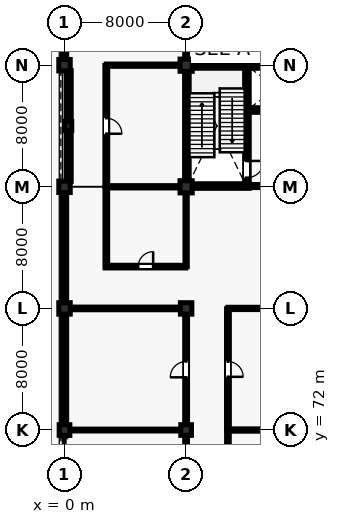
"""IFC4 building model, lengths in metres.
Left out: names, types, materials, properties, quantities, classifications, styles, units other than length and angle.
Written with IfcOpenShell. Run it as: python <this file> out.ifc"""

import sys

from ifc_helpers import new_model, si_unit, direction, frame, frame_2d, origin, origin_2d, place, context, subcontext, project, spatial, rectangle, extrude, element, fill, save


model = new_model("IFC4")
c1 = context("Model", 3, precision=1e-05, world=origin(), true_north=direction((0.0, 1.0)))
c2 = subcontext(c1, "Body", "Model", "MODEL_VIEW")
j1 = project(units=[si_unit("LENGTHUNIT", "METRE"), si_unit("PLANEANGLEUNIT", "RADIAN")], contexts=[c1])
p1 = place(None, origin())
s1 = spatial("IfcSite", under=j1, at=p1, CompositionType="ELEMENT")
p2 = place(p1, origin())
s2 = spatial("IfcBuilding", under=s1, at=p2, CompositionType="ELEMENT")
p3 = place(p2, origin())
s3 = spatial("IfcBuildingStorey", under=s2, at=p3, CompositionType="ELEMENT", Elevation=0.0)
p4 = place(p3, frame((0.0, 72.0, 0.0), z_axis=(0.0, 0.0, 1.0), x_axis=(1.0, 0.0, 0.0)))
e1 = element("IfcColumn", 1, at=p4, inside=s3, PredefinedType="COLUMN", context=c2, shape_type="SweptSolid", body=[
    extrude(rectangle(XDim=0.7, YDim=0.7, at=origin_2d()), origin(), (0.0, 0.0, 1.0), 5.28),
])
for number, where, z_axis, x_axis in (
    (2, (0.0, 80.0, 0.0), (0.0, 0.0, 1.0), (1.0, 0.0, 0.0)),
    (3, (0.0, 88.0, 0.0), (0.0, 0.0, 1.0), (1.0, 0.0, 0.0)),
    (4, (0.0, 96.0, 0.0), (0.0, 0.0, 1.0), (1.0, 0.0, 0.0)),
):
    element("IfcColumn", number, at=place(p3, frame(where, z_axis=z_axis, x_axis=x_axis)), inside=s3, PredefinedType="COLUMN", context=c2, shape_type="SweptSolid", body=[
        extrude(rectangle(XDim=0.75, YDim=0.75, at=origin_2d()), origin(), (0.0, 0.0, 1.0), 5.28),
    ])
p5 = place(p3, frame((8.0, 72.0, 0.0), z_axis=(0.0, 0.0, 1.0), x_axis=(1.0, 0.0, 0.0)))
e5 = element("IfcColumn", 5, at=p5, inside=s3, PredefinedType="COLUMN", context=c2, shape_type="SweptSolid", body=[
    extrude(rectangle(XDim=0.7, YDim=0.7, at=origin_2d()), origin(), (0.0, 0.0, 1.0), 5.28),
])
p6 = place(p3, frame((8.0, 80.0, 0.0), z_axis=(0.0, 0.0, 1.0), x_axis=(1.0, 0.0, 0.0)))
e6 = element("IfcColumn", 6, at=p6, inside=s3, PredefinedType="COLUMN", context=c2, shape_type="SweptSolid", body=[
    extrude(rectangle(XDim=0.75, YDim=0.75, at=origin_2d()), origin(), (0.0, 0.0, 1.0), 5.28),
])
for number, where, z_axis, x_axis in (
    (7, (8.0, 88.0, 0.0), (0.0, 0.0, 1.0), (1.0, 0.0, 0.0)),
    (8, (8.0, 96.0, 0.0), (0.0, 0.0, 1.0), (1.0, 0.0, 0.0)),
):
    element("IfcColumn", number, at=place(p3, frame(where, z_axis=z_axis, x_axis=x_axis)), inside=s3, PredefinedType="COLUMN", context=c2, shape_type="SweptSolid", body=[
        extrude(rectangle(XDim=0.8, YDim=0.8, at=origin_2d()), origin(), (0.0, 0.0, 1.0), 5.28),
    ])
p7 = place(p3, frame((0.25, 92.0, 0.0), z_axis=(0.0, 0.0, 1.0), x_axis=(1.0, 0.0, 0.0)))
e9 = element("IfcColumn", 9, at=p7, inside=s3, PredefinedType="PILASTER", context=c2, shape_type="SweptSolid", body=[
    extrude(rectangle(XDim=0.45, YDim=0.6, at=origin_2d()), origin(), (0.0, 0.0, 1.0), 5.28),
])
p8 = place(p3, frame((0.0, 72.335, 0.0), z_axis=(0.0, 0.0, 1.0), x_axis=(0.0, 1.0, 0.0)))
e10 = element("IfcWall", 10, at=p8, inside=s3, PredefinedType="SOLIDWALL", context=c2, shape_type="SweptSolid", body=[
    extrude(rectangle(XDim=7.305, YDim=0.28, at=frame_2d((3.652, 0.0))), origin(), (0.0, 0.0, 1.0), 4.674),
])
p9 = place(p8, frame((2.577, 0.0, 0.9)))
e11 = element("IfcOpeningElement", 11, at=p9, cuts=e10, PredefinedType="OPENING", context=c2, shape_type="SweptSolid", body=[
    extrude(rectangle(XDim=2.15, YDim=2.8, at=frame_2d((1.075, 1.4))), frame((0.0, 0.15, 0.0), z_axis=(0.0, -1.0, 0.0), x_axis=(1.0, 0.0, 0.0)), (0.0, 0.0, 1.0), 0.3),
])
p10 = place(p3, frame((0.0, 80.36, 0.0), z_axis=(0.0, 0.0, 1.0), x_axis=(0.0, 1.0, 0.0)))
e12 = element("IfcWall", 12, at=p10, inside=s3, PredefinedType="SOLIDWALL", context=c2, shape_type="SweptSolid", body=[
    extrude(rectangle(XDim=7.28, YDim=0.28, at=frame_2d((3.64, 0.0))), origin(), (0.0, 0.0, 1.0), 4.614),
])
p11 = place(p10, frame((0.735, 0.0, 0.95)))
e13 = element("IfcOpeningElement", 13, at=p11, cuts=e12, PredefinedType="OPENING", context=c2, shape_type="SweptSolid", body=[
    extrude(rectangle(XDim=1.15, YDim=1.65, at=frame_2d((0.575, 0.825))), frame((0.0, 0.15, 0.0), z_axis=(0.0, -1.0, 0.0), x_axis=(1.0, 0.0, 0.0)), (0.0, 0.0, 1.0), 0.3),
])
p12 = place(p10, frame((5.395, 0.0, 0.95)))
e14 = element("IfcOpeningElement", 14, at=p12, cuts=e12, PredefinedType="OPENING", context=c2, shape_type="SweptSolid", body=[
    extrude(rectangle(XDim=1.15, YDim=1.65, at=frame_2d((0.575, 0.825))), frame((0.0, 0.15, 0.0), z_axis=(0.0, -1.0, 0.0), x_axis=(1.0, 0.0, 0.0)), (0.0, 0.0, 1.0), 0.3),
])
p13 = place(p3, frame((0.3, 88.36, 0.0), z_axis=(0.0, 0.0, 1.0), x_axis=(0.0, 1.0, 0.0)))
e15 = element("IfcWall", 15, at=p13, inside=s3, PredefinedType="SOLIDWALL", context=c2, shape_type="SweptSolid", body=[
    extrude(rectangle(XDim=7.28, YDim=0.28, at=frame_2d((3.64, 0.0))), origin(), (0.0, 0.0, 1.0), 4.677),
])
p14 = place(p3, frame((0.0, 96.36, 0.0), z_axis=(0.0, 0.0, 1.0), x_axis=(0.0, 1.0, 0.0)))
e16 = element("IfcWall", 16, at=p14, inside=s3, PredefinedType="SOLIDWALL", context=c2, shape_type="SweptSolid", body=[
    extrude(rectangle(XDim=7.28, YDim=0.28, at=frame_2d((3.64, 0.0))), origin(), (0.0, 0.0, 1.0), 4.61),
])
p15 = place(p14, frame((2.54, 0.0, 0.0)))
e17 = element("IfcOpeningElement", 17, at=p15, cuts=e16, PredefinedType="OPENING", context=c2, shape_type="SweptSolid", body=[
    extrude(rectangle(XDim=2.2, YDim=2.5, at=frame_2d((1.1, 1.25))), frame((0.0, 0.15, 0.0), z_axis=(0.0, -1.0, 0.0), x_axis=(1.0, 0.0, 0.0)), (0.0, 0.0, 1.0), 0.3),
])
for number, where, z_axis, x_axis in (
    (18, (8.05, 88.29, 0.0), (0.0, 0.0, 1.0), (0.0, 1.0, 0.0)),
    (19, (8.29, 95.95, 0.0), (0.0, 0.0, 1.0), (1.0, 0.0, 0.0)),
):
    element("IfcWall", number, at=place(p3, frame(where, z_axis=z_axis, x_axis=x_axis)), inside=s3, PredefinedType="SHEAR", context=c2, shape_type="SweptSolid", body=[
        extrude(rectangle(XDim=7.42, YDim=0.3, at=frame_2d((3.71, 0.0))), origin(), (0.0, 0.0, 1.0), 5.035),
    ])
p16 = place(p3, frame((8.29, 88.05, 0.0), z_axis=(0.0, 0.0, 1.0), x_axis=(1.0, 0.0, 0.0)))
e20 = element("IfcWall", 20, at=p16, inside=s3, PredefinedType="SHEAR", context=c2, shape_type="SweptSolid", body=[
    extrude(rectangle(XDim=3.86, YDim=0.3, at=frame_2d((1.93, 0.0))), origin(), (0.0, 0.0, 1.0), 5.035),
])
p17 = place(p3, frame((12.0, 88.05, 0.0), z_axis=(0.0, 0.0, 1.0), x_axis=(0.0, 1.0, 0.0)))
e21 = element("IfcWall", 21, at=p17, inside=s3, PredefinedType="SHEAR", context=c2, shape_type="SweptSolid", body=[
    extrude(rectangle(XDim=7.9, YDim=0.3, at=frame_2d((3.95, 0.0))), origin(), (0.0, 0.0, 1.0), 5.035),
])
p18 = place(p17, frame((0.55, 0.0, 0.0)))
e22 = element("IfcOpeningElement", 22, at=p18, cuts=e21, PredefinedType="OPENING", context=c2, shape_type="SweptSolid", body=[
    extrude(rectangle(XDim=1.1, YDim=2.15, at=frame_2d((0.55, 1.075))), frame((0.0, 0.16, 0.0), z_axis=(0.0, -1.0, 0.0), x_axis=(1.0, 0.0, 0.0)), (0.0, 0.0, 1.0), 0.32),
])
p19 = place(p3, frame((12.0, 93.05, 0.0), z_axis=(0.0, 0.0, 1.0), x_axis=(1.0, 0.0, 0.0)))
e23 = element("IfcWall", 23, at=p19, inside=s3, PredefinedType="SHEAR", context=c2, shape_type="SweptSolid", body=[
    extrude(rectangle(XDim=3.95, YDim=0.3, at=frame_2d((1.975, 0.0))), origin(), (0.0, 0.0, 1.0), 5.035),
])
p20 = place(p19, frame((1.375, 0.0, 0.0)))
e24 = element("IfcOpeningElement", 24, at=p20, cuts=e23, PredefinedType="OPENING", context=c2, shape_type="SweptSolid", body=[
    extrude(rectangle(XDim=1.2, YDim=2.2, at=frame_2d((0.6, 1.1))), frame((0.0, 0.16, 0.0), z_axis=(0.0, -1.0, 0.0), x_axis=(1.0, 0.0, 0.0)), (0.0, 0.0, 1.0), 0.32),
])
p21 = place(p3, frame((12.0, 88.05, 0.0), z_axis=(0.0, 0.0, 1.0), x_axis=(1.0, 0.0, 0.0)))
e25 = element("IfcWall", 25, at=p21, inside=s3, PredefinedType="PARTITIONING", context=c2, shape_type="SweptSolid", body=[
    extrude(rectangle(XDim=3.61, YDim=0.2, at=frame_2d((1.805, 0.0))), origin(), (0.0, 0.0, 1.0), 4.327),
])
p22 = place(p21, frame((1.205, 0.0, 0.0)))
e26 = element("IfcOpeningElement", 26, at=p22, cuts=e25, PredefinedType="OPENING", context=c2, shape_type="SweptSolid", body=[
    extrude(rectangle(XDim=1.2, YDim=2.15, at=frame_2d((0.6, 1.075))), frame((0.0, 0.11, 0.0), z_axis=(0.0, -1.0, 0.0), x_axis=(1.0, 0.0, 0.0)), (0.0, 0.0, 1.0), 0.22),
])
p23 = place(p3, frame((2.7, 82.75, 0.0), z_axis=(0.0, 0.0, 1.0), x_axis=(1.0, 0.0, 0.0)))
e27 = element("IfcWall", 27, at=p23, inside=s3, PredefinedType="PARTITIONING", context=c2, shape_type="SweptSolid", body=[
    extrude(rectangle(XDim=5.28, YDim=0.175, at=frame_2d((2.64, 0.0))), origin(), (0.0, 0.0, 1.0), 4.471),
])
p24 = place(p23, frame((2.15, 0.0, 0.0)))
e28 = element("IfcOpeningElement", 28, at=p24, cuts=e27, PredefinedType="OPENING", context=c2, shape_type="SweptSolid", body=[
    extrude(rectangle(XDim=0.98, YDim=2.15, at=frame_2d((0.49, 1.075))), frame((0.0, 0.097, 0.0), z_axis=(0.0, -1.0, 0.0), x_axis=(1.0, 0.0, 0.0)), (0.0, 0.0, 1.0), 0.195),
])
p25 = place(p3, frame((2.75, 82.7, 0.0), z_axis=(0.0, 0.0, 1.0), x_axis=(0.0, 1.0, 0.0)))
e29 = element("IfcWall", 29, at=p25, inside=s3, PredefinedType="PARTITIONING", context=c2, shape_type="SweptSolid", body=[
    extrude(rectangle(XDim=5.28, YDim=0.175, at=frame_2d((2.64, 0.0))), origin(), (0.0, 0.0, 1.0), 4.404),
])
p26 = place(p3, frame((2.75, 88.0, 0.0), z_axis=(0.0, 0.0, 1.0), x_axis=(1.0, 0.0, 0.0)))
e30 = element("IfcWall", 30, at=p26, inside=s3, PredefinedType="PARTITIONING", context=c2, shape_type="SweptSolid", body=[
    extrude(rectangle(XDim=4.84, YDim=0.15, at=frame_2d((2.42, 0.0))), origin(), (0.0, 0.0, 1.0), 4.404),
])
p27 = place(p3, frame((8.0, 82.75, 0.0), z_axis=(0.0, 0.0, 1.0), x_axis=(0.0, 1.0, 0.0)))
e31 = element("IfcWall", 31, at=p27, inside=s3, PredefinedType="PARTITIONING", context=c2, shape_type="SweptSolid", body=[
    extrude(rectangle(XDim=4.84, YDim=0.15, at=frame_2d((2.42, 0.0))), origin(), (0.0, 0.0, 1.0), 4.471),
])
p28 = place(p3, frame((2.75, 88.02, 0.0), z_axis=(0.0, 0.0, 1.0), x_axis=(0.0, 1.0, 0.0)))
e32 = element("IfcWall", 32, at=p28, inside=s3, PredefinedType="PARTITIONING", context=c2, shape_type="SweptSolid", body=[
    extrude(rectangle(XDim=7.96, YDim=0.185, at=frame_2d((3.98, 0.0))), origin(), (0.0, 0.0, 1.0), 4.327),
])
p29 = place(p28, frame((3.47, 0.0, 0.0)))
e33 = element("IfcOpeningElement", 33, at=p29, cuts=e32, PredefinedType="OPENING", context=c2, shape_type="SweptSolid", body=[
    extrude(rectangle(XDim=1.02, YDim=2.2, at=frame_2d((0.51, 1.1))), frame((0.0, 0.103, 0.0), z_axis=(0.0, -1.0, 0.0), x_axis=(1.0, 0.0, 0.0)), (0.0, 0.0, 1.0), 0.205),
])
p30 = place(p3, frame((2.75, 96.0, 0.0), z_axis=(0.0, 0.0, 1.0), x_axis=(1.0, 0.0, 0.0)))
e34 = element("IfcWall", 34, at=p30, inside=s3, PredefinedType="PARTITIONING", context=c2, shape_type="SweptSolid", body=[
    extrude(rectangle(XDim=4.84, YDim=0.15, at=frame_2d((2.42, 0.0))), origin(), (0.0, 0.0, 1.0), 4.327),
])
p31 = place(p3, frame((10.75, 64.02, 0.0), z_axis=(0.0, 0.0, 1.0), x_axis=(0.0, 1.0, 0.0)))
e35 = element("IfcWall", 35, at=p31, inside=s3, PredefinedType="PARTITIONING", context=c2, shape_type="SweptSolid", body=[
    extrude(rectangle(XDim=7.96, YDim=0.175, at=frame_2d((3.98, 0.0))), origin(), (0.0, 0.0, 1.0), 4.341),
])
p32 = place(p31, frame((3.455, 0.0, 0.0)))
e36 = element("IfcOpeningElement", 36, at=p32, cuts=e35, PredefinedType="OPENING", context=c2, shape_type="SweptSolid", body=[
    extrude(rectangle(XDim=1.05, YDim=2.15, at=frame_2d((0.525, 1.075))), frame((0.0, 0.097, 0.0), z_axis=(0.0, -1.0, 0.0), x_axis=(1.0, 0.0, 0.0)), (0.0, 0.0, 1.0), 0.195),
])
p33 = place(p3, frame((10.75, 72.0, 0.0), z_axis=(0.0, 0.0, 1.0), x_axis=(1.0, 0.0, 0.0)))
e37 = element("IfcWall", 37, at=p33, inside=s3, PredefinedType="PARTITIONING", context=c2, shape_type="SweptSolid", body=[
    extrude(rectangle(XDim=4.89, YDim=0.15, at=frame_2d((2.445, 0.0))), origin(), (0.0, 0.0, 1.0), 4.341),
])
p34 = place(p3, frame((10.75, 72.02, 0.0), z_axis=(0.0, 0.0, 1.0), x_axis=(0.0, 1.0, 0.0)))
e38 = element("IfcWall", 38, at=p34, inside=s3, PredefinedType="PARTITIONING", context=c2, shape_type="SweptSolid", body=[
    extrude(rectangle(XDim=7.96, YDim=0.185, at=frame_2d((3.98, 0.0))), origin(), (0.0, 0.0, 1.0), 4.341),
])
p35 = place(p34, frame((3.48, 0.0, 0.0)))
e39 = element("IfcOpeningElement", 39, at=p35, cuts=e38, PredefinedType="OPENING", context=c2, shape_type="SweptSolid", body=[
    extrude(rectangle(XDim=1.0, YDim=2.15, at=frame_2d((0.5, 1.075))), frame((0.0, 0.103, 0.0), z_axis=(0.0, -1.0, 0.0), x_axis=(1.0, 0.0, 0.0)), (0.0, 0.0, 1.0), 0.205),
])
p36 = place(p3, frame((10.75, 80.0, 0.0), z_axis=(0.0, 0.0, 1.0), x_axis=(1.0, 0.0, 0.0)))
e40 = element("IfcWall", 40, at=p36, inside=s3, PredefinedType="PARTITIONING", context=c2, shape_type="SweptSolid", body=[
    extrude(rectangle(XDim=4.89, YDim=0.15, at=frame_2d((2.445, 0.0))), origin(), (0.0, 0.0, 1.0), 4.409),
])
p37 = place(p3, frame((8.0, 64.34, 0.0), z_axis=(0.0, 0.0, 1.0), x_axis=(0.0, 1.0, 0.0)))
e41 = element("IfcWall", 41, at=p37, inside=s3, PredefinedType="PARTITIONING", context=c2, shape_type="SweptSolid", body=[
    extrude(rectangle(XDim=7.32, YDim=0.185, at=frame_2d((3.66, 0.0))), origin(), (0.0, 0.0, 1.0), 4.412),
])
p38 = place(p37, frame((3.01, 0.0, 0.0)))
e42 = element("IfcOpeningElement", 42, at=p38, cuts=e41, PredefinedType="OPENING", context=c2, shape_type="SweptSolid", body=[
    extrude(rectangle(XDim=1.3, YDim=2.2, at=frame_2d((0.65, 1.1))), frame((0.0, 0.103, 0.0), z_axis=(0.0, -1.0, 0.0), x_axis=(1.0, 0.0, 0.0)), (0.0, 0.0, 1.0), 0.205),
])
p39 = place(p3, frame((0.34, 72.0, 0.0), z_axis=(0.0, 0.0, 1.0), x_axis=(1.0, 0.0, 0.0)))
e43 = element("IfcWall", 43, at=p39, inside=s3, PredefinedType="PARTITIONING", context=c2, shape_type="SweptSolid", body=[
    extrude(rectangle(XDim=7.32, YDim=0.12, at=frame_2d((3.66, 0.0))), origin(), (0.0, 0.0, 1.0), 4.403),
])
p40 = place(p3, frame((8.0, 72.34, 0.0), z_axis=(0.0, 0.0, 1.0), x_axis=(0.0, 1.0, 0.0)))
e44 = element("IfcWall", 44, at=p40, inside=s3, PredefinedType="PARTITIONING", context=c2, shape_type="SweptSolid", body=[
    extrude(rectangle(XDim=7.295, YDim=0.185, at=frame_2d((3.647, 0.0))), origin(), (0.0, 0.0, 1.0), 4.404),
])
p41 = place(p40, frame((3.127, 0.0, 0.0)))
e45 = element("IfcOpeningElement", 45, at=p41, cuts=e44, PredefinedType="OPENING", context=c2, shape_type="SweptSolid", body=[
    extrude(rectangle(XDim=1.04, YDim=2.18, at=frame_2d((0.52, 1.09))), frame((0.0, 0.103, 0.0), z_axis=(0.0, -1.0, 0.0), x_axis=(1.0, 0.0, 0.0)), (0.0, 0.0, 1.0), 0.205),
])
p42 = place(p3, frame((0.365, 80.0, 0.0), z_axis=(0.0, 0.0, 1.0), x_axis=(1.0, 0.0, 0.0)))
e46 = element("IfcWall", 46, at=p42, inside=s3, PredefinedType="PARTITIONING", context=c2, shape_type="SweptSolid", body=[
    extrude(rectangle(XDim=7.27, YDim=0.175, at=frame_2d((3.635, 0.0))), origin(), (0.0, 0.0, 1.0), 4.336),
])
p43 = place(p3, frame((8.0, 96.39, 0.0), z_axis=(0.0, 0.0, 1.0), x_axis=(0.0, 1.0, 0.0)))
e47 = element("IfcWall", 47, at=p43, inside=s3, PredefinedType="PARTITIONING", context=c2, shape_type="SweptSolid", body=[
    extrude(rectangle(XDim=7.245, YDim=0.185, at=frame_2d((3.623, 0.0))), origin(), (0.0, 0.0, 1.0), 4.412),
])
p44 = place(p43, frame((2.972, 0.0, 0.0)))
e48 = element("IfcOpeningElement", 48, at=p44, cuts=e47, PredefinedType="OPENING", context=c2, shape_type="SweptSolid", body=[
    extrude(rectangle(XDim=1.3, YDim=2.2, at=frame_2d((0.65, 1.1))), frame((0.0, 0.103, 0.0), z_axis=(0.0, -1.0, 0.0), x_axis=(1.0, 0.0, 0.0)), (0.0, 0.0, 1.0), 0.205),
])
p45 = place(p9, origin())
e49 = element("IfcWindow", 49, at=p45, inside=s3, PartitioningType="SINGLE_PANEL", PredefinedType="WINDOW", context=c2, shape_type="SweptSolid", body=[
    extrude(rectangle(XDim=2.15, YDim=2.8, at=frame_2d((1.075, 1.4))), frame((0.0, 0.03, 0.0), z_axis=(0.0, -1.0, 0.0), x_axis=(1.0, 0.0, 0.0)), (0.0, 0.0, 1.0), 0.06),
])
fill(e11, e49)
p46 = place(p11, origin())
e50 = element("IfcWindow", 50, at=p46, inside=s3, PartitioningType="SINGLE_PANEL", PredefinedType="WINDOW", context=c2, shape_type="SweptSolid", body=[
    extrude(rectangle(XDim=1.15, YDim=1.65, at=frame_2d((0.575, 0.825))), frame((0.0, 0.03, 0.0), z_axis=(0.0, -1.0, 0.0), x_axis=(1.0, 0.0, 0.0)), (0.0, 0.0, 1.0), 0.06),
])
fill(e13, e50)
p47 = place(p12, origin())
e51 = element("IfcWindow", 51, at=p47, inside=s3, PartitioningType="SINGLE_PANEL", PredefinedType="WINDOW", context=c2, shape_type="SweptSolid", body=[
    extrude(rectangle(XDim=1.15, YDim=1.65, at=frame_2d((0.575, 0.825))), frame((0.0, 0.03, 0.0), z_axis=(0.0, -1.0, 0.0), x_axis=(1.0, 0.0, 0.0)), (0.0, 0.0, 1.0), 0.06),
])
fill(e14, e51)
p48 = place(p18, frame((1.1, 0.0, 0.0), z_axis=(0.0, 0.0, 1.0), x_axis=(-1.0, 0.0, 0.0)))
e52 = element("IfcDoor", 52, at=p48, inside=s3, OperationType="SINGLE_SWING_RIGHT", PredefinedType="DOOR", context=c2, shape_type="SweptSolid", body=[
    extrude(rectangle(XDim=1.1, YDim=2.15, at=frame_2d((0.55, 1.075))), frame((0.0, 0.025, 0.0), z_axis=(0.0, -1.0, 0.0), x_axis=(1.0, 0.0, 0.0)), (0.0, 0.0, 1.0), 0.05),
])
fill(e22, e52)
p49 = place(p24, origin())
e53 = element("IfcDoor", 53, at=p49, inside=s3, OperationType="SINGLE_SWING_RIGHT", PredefinedType="DOOR", context=c2, shape_type="SweptSolid", body=[
    extrude(rectangle(XDim=0.98, YDim=2.15, at=frame_2d((0.49, 1.075))), frame((0.0, 0.025, 0.0), z_axis=(0.0, -1.0, 0.0), x_axis=(1.0, 0.0, 0.0)), (0.0, 0.0, 1.0), 0.05),
])
fill(e28, e53)
p50 = place(p29, frame((1.02, 0.0, 0.0), z_axis=(0.0, 0.0, 1.0), x_axis=(-1.0, 0.0, 0.0)))
e54 = element("IfcDoor", 54, at=p50, inside=s3, OperationType="SINGLE_SWING_LEFT", PredefinedType="DOOR", context=c2, shape_type="SweptSolid", body=[
    extrude(rectangle(XDim=1.02, YDim=2.2, at=frame_2d((0.51, 1.1))), frame((0.0, 0.025, 0.0), z_axis=(0.0, -1.0, 0.0), x_axis=(1.0, 0.0, 0.0)), (0.0, 0.0, 1.0), 0.05),
])
fill(e33, e54)
p51 = place(p35, frame((1.0, 0.0, 0.0), z_axis=(0.0, 0.0, 1.0), x_axis=(-1.0, 0.0, 0.0)))
e55 = element("IfcDoor", 55, at=p51, inside=s3, OperationType="SINGLE_SWING_LEFT", PredefinedType="DOOR", context=c2, shape_type="SweptSolid", body=[
    extrude(rectangle(XDim=1.0, YDim=2.15, at=frame_2d((0.5, 1.075))), frame((0.0, 0.025, 0.0), z_axis=(0.0, -1.0, 0.0), x_axis=(1.0, 0.0, 0.0)), (0.0, 0.0, 1.0), 0.05),
])
fill(e39, e55)
p52 = place(p41, origin())
e56 = element("IfcDoor", 56, at=p52, inside=s3, OperationType="SINGLE_SWING_LEFT", PredefinedType="DOOR", context=c2, shape_type="SweptSolid", body=[
    extrude(rectangle(XDim=1.04, YDim=2.18, at=frame_2d((0.52, 1.09))), frame((0.0, 0.025, 0.0), z_axis=(0.0, -1.0, 0.0), x_axis=(1.0, 0.0, 0.0)), (0.0, 0.0, 1.0), 0.05),
])
fill(e45, e56)
save(model, sys.argv[1])
